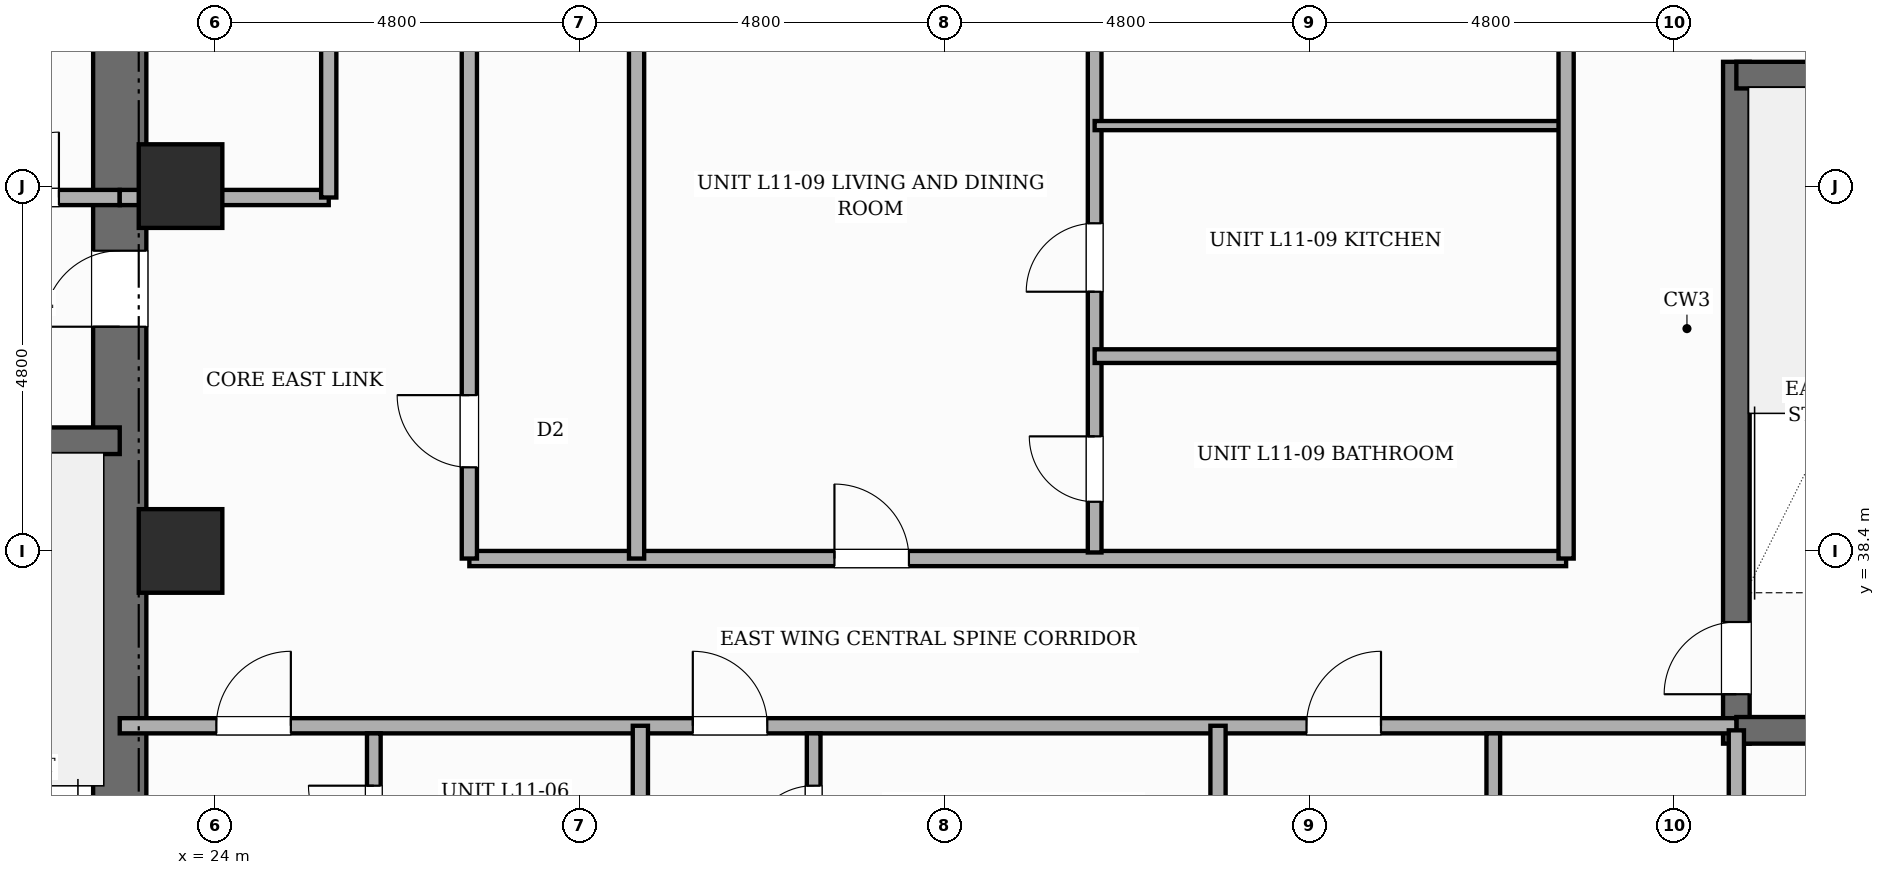
"""IFC4 building model, lengths in metres.
Left out: names, types, materials, properties, quantities, classifications, styles, units other than length and angle.
Written with IfcOpenShell. Run it as: python <this file> out.ifc"""

import sys

from ifc_helpers import new_model, si_unit, direction, frame, frame_2d, origin, origin_2d, place, context, subcontext, project, spatial, rectangle, extrude, element, fill, save


model = new_model("IFC4")
c1 = context("Model", 3, precision=1e-05, world=origin(), true_north=direction((0.0, 1.0)))
c2 = subcontext(c1, "Body", "Model", "MODEL_VIEW")
j1 = project(units=[si_unit("LENGTHUNIT", "METRE"), si_unit("PLANEANGLEUNIT", "RADIAN")], contexts=[c1])
p1 = place(None, origin())
s1 = spatial("IfcSite", under=j1, at=p1, CompositionType="ELEMENT")
p2 = place(p1, origin())
s2 = spatial("IfcBuilding", under=s1, at=p2, CompositionType="ELEMENT")
p3 = place(p2, frame((0.0, 0.0, 46.6)))
s3 = spatial("IfcBuildingStorey", under=s2, at=p3, CompositionType="ELEMENT", Elevation=46.6)
p4 = place(p3, frame((22.75, 30.55, 0.0), z_axis=(0.0, 0.0, 1.0), x_axis=(0.0, 1.0, 0.0)))
e1 = element("IfcWall", 1, at=p4, inside=s3, PredefinedType="SHEAR", context=c2, shape_type="SweptSolid", body=[
    extrude(rectangle(XDim=15.6, YDim=0.7, at=frame_2d((7.8, 0.0))), origin(), (0.0, 0.0, 1.0), 3.6),
])
p5 = place(p4, frame((10.8, 0.0, 0.0)))
e2 = element("IfcOpeningElement", 2, at=p5, cuts=e1, PredefinedType="OPENING", context=c2, shape_type="SweptSolid", body=[
    extrude(rectangle(XDim=1.0, YDim=2.15, at=frame_2d((0.5, 1.075))), frame((0.0, 0.36, 0.0), z_axis=(0.0, -1.0, 0.0), x_axis=(1.0, 0.0, 0.0)), (0.0, 0.0, 1.0), 0.72),
])
p6 = place(p3, frame((18.84, 39.85, 0.0), z_axis=(0.0, 0.0, 1.0), x_axis=(1.0, 0.0, 0.0)))
e3 = element("IfcWall", 3, at=p6, inside=s3, PredefinedType="SHEAR", context=c2, shape_type="SweptSolid", body=[
    extrude(rectangle(XDim=3.91, YDim=0.35, at=frame_2d((1.955, 0.0))), origin(), (0.0, 0.0, 1.0), 3.6),
])
p7 = place(p3, frame((44.02, 35.865, 0.0), z_axis=(0.0, 0.0, 1.0), x_axis=(0.0, 1.0, 0.0)))
e4 = element("IfcWall", 4, at=p7, inside=s3, PredefinedType="SHEAR", context=c2, shape_type="SweptSolid", body=[
    extrude(rectangle(XDim=8.97, YDim=0.35, at=frame_2d((4.485, 0.0))), origin(), (0.0, 0.0, 1.0), 3.6),
])
p8 = place(p7, frame((0.65, 0.0, 0.0)))
e5 = element("IfcOpeningElement", 5, at=p8, cuts=e4, PredefinedType="OPENING", context=c2, shape_type="SweptSolid", body=[
    extrude(rectangle(XDim=0.95, YDim=2.1, at=frame_2d((0.475, 1.05))), frame((0.0, 0.185, 0.0), z_axis=(0.0, -1.0, 0.0), x_axis=(1.0, 0.0, 0.0)), (0.0, 0.0, 1.0), 0.37),
])
for number, where, z_axis, x_axis in (
    (6, (44.02, 36.04, 0.0), (0.0, 0.0, 1.0), (1.0, 0.0, 0.0)),
    (7, (44.02, 44.66, 0.0), (0.0, 0.0, 1.0), (1.0, 0.0, 0.0)),
):
    element("IfcWall", number, at=place(p3, frame(where, z_axis=z_axis, x_axis=x_axis)), inside=s3, PredefinedType="SHEAR", context=c2, shape_type="SweptSolid", body=[
        extrude(rectangle(XDim=3.58, YDim=0.35, at=frame_2d((1.79, 0.0))), origin(), (0.0, 0.0, 1.0), 3.6),
    ])
for number, where, z_axis, x_axis in (
    (8, (23.55, 38.4, 0.0), (0.0, 0.0, 1.0), (1.0, 0.0, 0.0)),
    (9, (23.55, 43.2, 0.0), (0.0, 0.0, 1.0), (1.0, 0.0, 0.0)),
):
    element("IfcColumn", number, at=place(p3, frame(where, z_axis=z_axis, x_axis=x_axis)), inside=s3, PredefinedType="COLUMN", context=c2, shape_type="SweptSolid", body=[
        extrude(rectangle(XDim=1.1, YDim=1.1, at=origin_2d()), origin(), (0.0, 0.0, 1.0), 3.6),
    ])
p9 = place(p3, frame((18.84, 43.05, 0.0), z_axis=(0.0, 0.0, 1.0), x_axis=(1.0, 0.0, 0.0)))
e10 = element("IfcWall", 10, at=p9, inside=s3, PredefinedType="POLYGONAL", context=c2, shape_type="SweptSolid", body=[
    extrude(rectangle(XDim=3.91, YDim=0.2, at=frame_2d((1.955, 0.0))), origin(), (0.0, 0.0, 1.0), 2.53),
])
p10 = place(p9, frame((0.55, 0.0, 0.0)))
e11 = element("IfcOpeningElement", 11, at=p10, cuts=e10, PredefinedType="OPENING", context=c2, shape_type="SweptSolid", body=[
    extrude(rectangle(XDim=0.88, YDim=2.1, at=frame_2d((0.44, 1.05))), frame((0.0, 0.11, 0.0), z_axis=(0.0, -1.0, 0.0), x_axis=(1.0, 0.0, 0.0)), (0.0, 0.0, 1.0), 0.22),
])
p11 = place(p9, frame((2.25, 0.0, 0.0)))
e12 = element("IfcOpeningElement", 12, at=p11, cuts=e10, PredefinedType="OPENING", context=c2, shape_type="SweptSolid", body=[
    extrude(rectangle(XDim=0.86, YDim=2.1, at=frame_2d((0.43, 1.05))), frame((0.0, 0.11, 0.0), z_axis=(0.0, -1.0, 0.0), x_axis=(1.0, 0.0, 0.0)), (0.0, 0.0, 1.0), 0.22),
])
p12 = place(p3, frame((22.75, 36.1, 0.0), z_axis=(0.0, 0.0, 1.0), x_axis=(1.0, 0.0, 0.0)))
e13 = element("IfcWall", 13, at=p12, inside=s3, PredefinedType="PARTITIONING", context=c2, shape_type="SweptSolid", body=[
    extrude(rectangle(XDim=21.27, YDim=0.2, at=frame_2d((10.635, 0.0))), origin(), (0.0, 0.0, 1.0), 3.35),
])
p13 = place(p12, frame((1.271, 0.0, 0.0)))
e14 = element("IfcOpeningElement", 14, at=p13, cuts=e13, PredefinedType="OPENING", context=c2, shape_type="SweptSolid", body=[
    extrude(rectangle(XDim=0.98, YDim=2.18, at=frame_2d((0.49, 1.09))), frame((0.0, 0.11, 0.0), z_axis=(0.0, -1.0, 0.0), x_axis=(1.0, 0.0, 0.0)), (0.0, 0.0, 1.0), 0.22),
])
p14 = place(p12, frame((7.54, 0.0, 0.0)))
e15 = element("IfcOpeningElement", 15, at=p14, cuts=e13, PredefinedType="OPENING", context=c2, shape_type="SweptSolid", body=[
    extrude(rectangle(XDim=0.98, YDim=2.18, at=frame_2d((0.49, 1.09))), frame((0.0, 0.11, 0.0), z_axis=(0.0, -1.0, 0.0), x_axis=(1.0, 0.0, 0.0)), (0.0, 0.0, 1.0), 0.22),
])
p15 = place(p12, frame((15.615, 0.0, 0.0)))
e16 = element("IfcOpeningElement", 16, at=p15, cuts=e13, PredefinedType="OPENING", context=c2, shape_type="SweptSolid", body=[
    extrude(rectangle(XDim=0.98, YDim=2.18, at=frame_2d((0.49, 1.09))), frame((0.0, 0.11, 0.0), z_axis=(0.0, -1.0, 0.0), x_axis=(1.0, 0.0, 0.0)), (0.0, 0.0, 1.0), 0.22),
])
p16 = place(p3, frame((27.35, 38.3, 0.0), z_axis=(0.0, 0.0, 1.0), x_axis=(1.0, 0.0, 0.0)))
e17 = element("IfcWall", 17, at=p16, inside=s3, PredefinedType="PARTITIONING", context=c2, shape_type="SweptSolid", body=[
    extrude(rectangle(XDim=14.43, YDim=0.2, at=frame_2d((7.215, 0.0))), origin(), (0.0, 0.0, 1.0), 3.35),
])
p17 = place(p16, frame((4.803, 0.0, 0.0)))
e18 = element("IfcOpeningElement", 18, at=p17, cuts=e17, PredefinedType="OPENING", context=c2, shape_type="SweptSolid", body=[
    extrude(rectangle(XDim=0.98, YDim=2.18, at=frame_2d((0.49, 1.09))), frame((0.0, 0.11, 0.0), z_axis=(0.0, -1.0, 0.0), x_axis=(1.0, 0.0, 0.0)), (0.0, 0.0, 1.0), 0.22),
])
p18 = place(p3, frame((27.35, 38.3, 0.0), z_axis=(0.0, 0.0, 1.0), x_axis=(0.0, 1.0, 0.0)))
e19 = element("IfcWall", 19, at=p18, inside=s3, PredefinedType="PARTITIONING", context=c2, shape_type="SweptSolid", body=[
    extrude(rectangle(XDim=9.38, YDim=0.2, at=frame_2d((4.69, 0.0))), origin(), (0.0, 0.0, 1.0), 3.35),
])
p19 = place(p18, frame((1.2, 0.0, 0.0)))
e20 = element("IfcOpeningElement", 20, at=p19, cuts=e19, PredefinedType="OPENING", context=c2, shape_type="SweptSolid", body=[
    extrude(rectangle(XDim=0.95, YDim=2.15, at=frame_2d((0.475, 1.075))), frame((0.0, 0.11, 0.0), z_axis=(0.0, -1.0, 0.0), x_axis=(1.0, 0.0, 0.0)), (0.0, 0.0, 1.0), 0.22),
])
p20 = place(p3, frame((22.75, 43.05, 0.0), z_axis=(0.0, 0.0, 1.0), x_axis=(1.0, 0.0, 0.0)))
e21 = element("IfcWall", 21, at=p20, inside=s3, PredefinedType="PARTITIONING", context=c2, shape_type="SweptSolid", body=[
    extrude(rectangle(XDim=2.75, YDim=0.2, at=frame_2d((1.375, 0.0))), origin(), (0.0, 0.0, 1.0), 2.53),
])
p21 = place(p3, frame((25.5, 43.05, 0.0), z_axis=(0.0, 0.0, 1.0), x_axis=(0.0, 1.0, 0.0)))
e22 = element("IfcWall", 22, at=p21, inside=s3, PredefinedType="PARTITIONING", context=c2, shape_type="SweptSolid", body=[
    extrude(rectangle(XDim=2.75, YDim=0.2, at=frame_2d((1.375, 0.0))), origin(), (0.0, 0.0, 1.0), 3.35),
])
p22 = place(p3, frame((29.55, 38.3, 0.0), z_axis=(0.0, 0.0, 1.0), x_axis=(0.0, 1.0, 0.0)))
e23 = element("IfcWall", 23, at=p22, inside=s3, PredefinedType="SOLIDWALL", context=c2, shape_type="SweptSolid", body=[
    extrude(rectangle(XDim=9.38, YDim=0.2, at=frame_2d((4.69, 0.0))), origin(), (0.0, 0.0, 1.0), 3.35),
])
p23 = place(p3, frame((26.093, 29.1, 0.0), z_axis=(0.0, 0.0, 1.0), x_axis=(0.0, 1.0, 0.0)))
e24 = element("IfcWall", 24, at=p23, inside=s3, PredefinedType="PLUMBINGWALL", context=c2, shape_type="SweptSolid", body=[
    extrude(rectangle(XDim=6.9, YDim=0.18, at=frame_2d((3.45, 0.0))), origin(), (0.0, 0.0, 1.0), 3.35),
])
p24 = place(p23, frame((0.637, 0.0, 0.0)))
e25 = element("IfcOpeningElement", 25, at=p24, cuts=e24, PredefinedType="OPENING", context=c2, shape_type="SweptSolid", body=[
    extrude(rectangle(XDim=0.9, YDim=2.15, at=frame_2d((0.45, 1.075))), frame((0.0, 0.1, 0.0), z_axis=(0.0, -1.0, 0.0), x_axis=(1.0, 0.0, 0.0)), (0.0, 0.0, 1.0), 0.2),
])
p25 = place(p23, frame((3.23, 0.0, 0.0)))
e26 = element("IfcOpeningElement", 26, at=p25, cuts=e24, PredefinedType="OPENING", context=c2, shape_type="SweptSolid", body=[
    extrude(rectangle(XDim=0.9, YDim=2.15, at=frame_2d((0.45, 1.075))), frame((0.0, 0.1, 0.0), z_axis=(0.0, -1.0, 0.0), x_axis=(1.0, 0.0, 0.0)), (0.0, 0.0, 1.0), 0.2),
])
p26 = place(p23, frame((5.352, 0.0, 0.0)))
e27 = element("IfcOpeningElement", 27, at=p26, cuts=e24, PredefinedType="OPENING", context=c2, shape_type="SweptSolid", body=[
    extrude(rectangle(XDim=0.86, YDim=2.1, at=frame_2d((0.43, 1.05))), frame((0.0, 0.1, 0.0), z_axis=(0.0, -1.0, 0.0), x_axis=(1.0, 0.0, 0.0)), (0.0, 0.0, 1.0), 0.2),
])
p27 = place(p3, frame((29.6, 29.12, 0.0), z_axis=(0.0, 0.0, 1.0), x_axis=(0.0, 1.0, 0.0)))
e28 = element("IfcWall", 28, at=p27, inside=s3, PredefinedType="SOLIDWALL", context=c2, shape_type="SweptSolid", body=[
    extrude(rectangle(XDim=6.98, YDim=0.2, at=frame_2d((3.49, 0.0))), origin(), (0.0, 0.0, 1.0), 3.35),
])
p28 = place(p3, frame((31.88, 29.12, 0.0), z_axis=(0.0, 0.0, 1.0), x_axis=(0.0, 1.0, 0.0)))
e29 = element("IfcWall", 29, at=p28, inside=s3, PredefinedType="PLUMBINGWALL", context=c2, shape_type="SweptSolid", body=[
    extrude(rectangle(XDim=6.88, YDim=0.18, at=frame_2d((3.44, 0.0))), origin(), (0.0, 0.0, 1.0), 3.35),
])
p29 = place(p28, frame((0.917, 0.0, 0.0)))
e30 = element("IfcOpeningElement", 30, at=p29, cuts=e29, PredefinedType="OPENING", context=c2, shape_type="SweptSolid", body=[
    extrude(rectangle(XDim=0.9, YDim=2.15, at=frame_2d((0.45, 1.075))), frame((0.0, 0.1, 0.0), z_axis=(0.0, -1.0, 0.0), x_axis=(1.0, 0.0, 0.0)), (0.0, 0.0, 1.0), 0.2),
])
p30 = place(p28, frame((3.21, 0.0, 0.0)))
e31 = element("IfcOpeningElement", 31, at=p30, cuts=e29, PredefinedType="OPENING", context=c2, shape_type="SweptSolid", body=[
    extrude(rectangle(XDim=0.9, YDim=2.15, at=frame_2d((0.45, 1.075))), frame((0.0, 0.1, 0.0), z_axis=(0.0, -1.0, 0.0), x_axis=(1.0, 0.0, 0.0)), (0.0, 0.0, 1.0), 0.2),
])
p31 = place(p28, frame((5.332, 0.0, 0.0)))
e32 = element("IfcOpeningElement", 32, at=p31, cuts=e29, PredefinedType="OPENING", context=c2, shape_type="SweptSolid", body=[
    extrude(rectangle(XDim=0.86, YDim=2.1, at=frame_2d((0.43, 1.05))), frame((0.0, 0.1, 0.0), z_axis=(0.0, -1.0, 0.0), x_axis=(1.0, 0.0, 0.0)), (0.0, 0.0, 1.0), 0.2),
])
p32 = place(p3, frame((37.2, 29.12, 0.0), z_axis=(0.0, 0.0, 1.0), x_axis=(0.0, 1.0, 0.0)))
e33 = element("IfcWall", 33, at=p32, inside=s3, PredefinedType="SOLIDWALL", context=c2, shape_type="SweptSolid", body=[
    extrude(rectangle(XDim=6.98, YDim=0.2, at=frame_2d((3.49, 0.0))), origin(), (0.0, 0.0, 1.0), 3.35),
])
p33 = place(p3, frame((40.822, 29.12, 0.0), z_axis=(0.0, 0.0, 1.0), x_axis=(0.0, 1.0, 0.0)))
e34 = element("IfcWall", 34, at=p33, inside=s3, PredefinedType="PLUMBINGWALL", context=c2, shape_type="SweptSolid", body=[
    extrude(rectangle(XDim=6.88, YDim=0.18, at=frame_2d((3.44, 0.0))), origin(), (0.0, 0.0, 1.0), 3.35),
])
p34 = place(p33, frame((1.116, 0.0, 0.0)))
e35 = element("IfcOpeningElement", 35, at=p34, cuts=e34, PredefinedType="OPENING", context=c2, shape_type="SweptSolid", body=[
    extrude(rectangle(XDim=0.9, YDim=2.15, at=frame_2d((0.45, 1.075))), frame((0.0, 0.1, 0.0), z_axis=(0.0, -1.0, 0.0), x_axis=(1.0, 0.0, 0.0)), (0.0, 0.0, 1.0), 0.2),
])
p35 = place(p33, frame((4.705, 0.0, 0.0)))
e36 = element("IfcOpeningElement", 36, at=p35, cuts=e34, PredefinedType="OPENING", context=c2, shape_type="SweptSolid", body=[
    extrude(rectangle(XDim=0.86, YDim=2.1, at=frame_2d((0.43, 1.05))), frame((0.0, 0.1, 0.0), z_axis=(0.0, -1.0, 0.0), x_axis=(1.0, 0.0, 0.0)), (0.0, 0.0, 1.0), 0.2),
])
p36 = place(p3, frame((35.577, 38.38, 0.0), z_axis=(0.0, 0.0, 1.0), x_axis=(0.0, 1.0, 0.0)))
e37 = element("IfcWall", 37, at=p36, inside=s3, PredefinedType="PLUMBINGWALL", context=c2, shape_type="SweptSolid", body=[
    extrude(rectangle(XDim=9.3, YDim=0.18, at=frame_2d((4.65, 0.0))), origin(), (0.0, 0.0, 1.0), 3.35),
])
p37 = place(p36, frame((0.667, 0.0, 0.0)))
e38 = element("IfcOpeningElement", 38, at=p37, cuts=e37, PredefinedType="OPENING", context=c2, shape_type="SweptSolid", body=[
    extrude(rectangle(XDim=0.86, YDim=2.1, at=frame_2d((0.43, 1.05))), frame((0.0, 0.1, 0.0), z_axis=(0.0, -1.0, 0.0), x_axis=(1.0, 0.0, 0.0)), (0.0, 0.0, 1.0), 0.2),
])
p38 = place(p36, frame((3.43, 0.0, 0.0)))
e39 = element("IfcOpeningElement", 39, at=p38, cuts=e37, PredefinedType="OPENING", context=c2, shape_type="SweptSolid", body=[
    extrude(rectangle(XDim=0.9, YDim=2.15, at=frame_2d((0.45, 1.075))), frame((0.0, 0.1, 0.0), z_axis=(0.0, -1.0, 0.0), x_axis=(1.0, 0.0, 0.0)), (0.0, 0.0, 1.0), 0.2),
])
p39 = place(p36, frame((6.828, 0.0, 0.0)))
e40 = element("IfcOpeningElement", 40, at=p39, cuts=e37, PredefinedType="OPENING", context=c2, shape_type="SweptSolid", body=[
    extrude(rectangle(XDim=0.9, YDim=2.15, at=frame_2d((0.45, 1.075))), frame((0.0, 0.1, 0.0), z_axis=(0.0, -1.0, 0.0), x_axis=(1.0, 0.0, 0.0)), (0.0, 0.0, 1.0), 0.2),
])
p40 = place(p3, frame((35.577, 40.963, 0.0), z_axis=(0.0, 0.0, 1.0), x_axis=(1.0, 0.0, 0.0)))
e41 = element("IfcWall", 41, at=p40, inside=s3, PredefinedType="PLUMBINGWALL", context=c2, shape_type="SweptSolid", body=[
    extrude(rectangle(XDim=6.123, YDim=0.18, at=frame_2d((3.062, 0.0))), origin(), (0.0, 0.0, 1.0), 3.35),
])
p41 = place(p3, frame((35.577, 43.996, 0.0), z_axis=(0.0, 0.0, 1.0), x_axis=(1.0, 0.0, 0.0)))
e42 = element("IfcWall", 42, at=p41, inside=s3, PredefinedType="PARTITIONING", context=c2, shape_type="SweptSolid", body=[
    extrude(rectangle(XDim=6.123, YDim=0.12, at=frame_2d((3.062, 0.0))), origin(), (0.0, 0.0, 1.0), 3.35),
])
p42 = place(p3, frame((41.78, 38.3, 0.0), z_axis=(0.0, 0.0, 1.0), x_axis=(0.0, 1.0, 0.0)))
e43 = element("IfcWall", 43, at=p42, inside=s3, PredefinedType="PARTITIONING", context=c2, shape_type="SweptSolid", body=[
    extrude(rectangle(XDim=9.38, YDim=0.2, at=frame_2d((4.69, 0.0))), origin(), (0.0, 0.0, 1.0), 3.35),
])
p43 = place(p3, frame((44.02, 29.12, 0.0), z_axis=(0.0, 0.0, 1.0), x_axis=(0.0, 1.0, 0.0)))
e44 = element("IfcWall", 44, at=p43, inside=s3, PredefinedType="SOLIDWALL", context=c2, shape_type="SweptSolid", body=[
    extrude(rectangle(XDim=6.92, YDim=0.2, at=frame_2d((3.46, 0.0))), origin(), (0.0, 0.0, 1.0), 3.35),
])
p44 = place(p8, origin())
e45 = element("IfcDoor", 45, at=p44, inside=s3, OperationType="SINGLE_SWING_LEFT", PredefinedType="DOOR", context=c2, shape_type="SweptSolid", body=[
    extrude(rectangle(XDim=0.95, YDim=2.1, at=frame_2d((0.475, 1.05))), frame((0.0, 0.025, 0.0), z_axis=(0.0, -1.0, 0.0), x_axis=(1.0, 0.0, 0.0)), (0.0, 0.0, 1.0), 0.05),
])
fill(e5, e45)
p45 = place(p5, origin())
e46 = element("IfcDoor", 46, at=p45, inside=s3, OperationType="SINGLE_SWING_LEFT", PredefinedType="DOOR", context=c2, shape_type="SweptSolid", body=[
    extrude(rectangle(XDim=1.0, YDim=2.15, at=frame_2d((0.5, 1.075))), frame((0.0, 0.025, 0.0), z_axis=(0.0, -1.0, 0.0), x_axis=(1.0, 0.0, 0.0)), (0.0, 0.0, 1.0), 0.05),
])
fill(e2, e46)
p46 = place(p11, origin())
e47 = element("IfcDoor", 47, at=p46, inside=s3, OperationType="SINGLE_SWING_RIGHT", PredefinedType="DOOR", context=c2, shape_type="SweptSolid", body=[
    extrude(rectangle(XDim=0.86, YDim=2.1, at=frame_2d((0.43, 1.05))), frame((0.0, 0.025, 0.0), z_axis=(0.0, -1.0, 0.0), x_axis=(1.0, 0.0, 0.0)), (0.0, 0.0, 1.0), 0.05),
])
fill(e12, e47)
p47 = place(p19, origin())
e48 = element("IfcDoor", 48, at=p47, inside=s3, OperationType="SINGLE_SWING_RIGHT", PredefinedType="DOOR", context=c2, shape_type="SweptSolid", body=[
    extrude(rectangle(XDim=0.95, YDim=2.15, at=frame_2d((0.475, 1.075))), frame((0.0, 0.025, 0.0), z_axis=(0.0, -1.0, 0.0), x_axis=(1.0, 0.0, 0.0)), (0.0, 0.0, 1.0), 0.05),
])
fill(e20, e48)
p48 = place(p13, origin())
e49 = element("IfcDoor", 49, at=p48, inside=s3, OperationType="SINGLE_SWING_RIGHT", PredefinedType="DOOR", context=c2, shape_type="SweptSolid", body=[
    extrude(rectangle(XDim=0.98, YDim=2.18, at=frame_2d((0.49, 1.09))), frame((0.0, 0.025, 0.0), z_axis=(0.0, -1.0, 0.0), x_axis=(1.0, 0.0, 0.0)), (0.0, 0.0, 1.0), 0.05),
])
fill(e14, e49)
p49 = place(p26, origin())
e50 = element("IfcDoor", 50, at=p49, inside=s3, OperationType="SINGLE_SWING_RIGHT", PredefinedType="DOOR", context=c2, shape_type="SweptSolid", body=[
    extrude(rectangle(XDim=0.86, YDim=2.1, at=frame_2d((0.43, 1.05))), frame((0.0, 0.025, 0.0), z_axis=(0.0, -1.0, 0.0), x_axis=(1.0, 0.0, 0.0)), (0.0, 0.0, 1.0), 0.05),
])
fill(e27, e50)
p50 = place(p14, origin())
e51 = element("IfcDoor", 51, at=p50, inside=s3, OperationType="SINGLE_SWING_LEFT", PredefinedType="DOOR", context=c2, shape_type="SweptSolid", body=[
    extrude(rectangle(XDim=0.98, YDim=2.18, at=frame_2d((0.49, 1.09))), frame((0.0, 0.025, 0.0), z_axis=(0.0, -1.0, 0.0), x_axis=(1.0, 0.0, 0.0)), (0.0, 0.0, 1.0), 0.05),
])
fill(e15, e51)
p51 = place(p31, origin())
e52 = element("IfcDoor", 52, at=p51, inside=s3, OperationType="SINGLE_SWING_LEFT", PredefinedType="DOOR", context=c2, shape_type="SweptSolid", body=[
    extrude(rectangle(XDim=0.86, YDim=2.1, at=frame_2d((0.43, 1.05))), frame((0.0, 0.025, 0.0), z_axis=(0.0, -1.0, 0.0), x_axis=(1.0, 0.0, 0.0)), (0.0, 0.0, 1.0), 0.05),
])
fill(e32, e52)
p52 = place(p15, origin())
e53 = element("IfcDoor", 53, at=p52, inside=s3, OperationType="SINGLE_SWING_RIGHT", PredefinedType="DOOR", context=c2, shape_type="SweptSolid", body=[
    extrude(rectangle(XDim=0.98, YDim=2.18, at=frame_2d((0.49, 1.09))), frame((0.0, 0.025, 0.0), z_axis=(0.0, -1.0, 0.0), x_axis=(1.0, 0.0, 0.0)), (0.0, 0.0, 1.0), 0.05),
])
fill(e16, e53)
p53 = place(p17, origin())
e54 = element("IfcDoor", 54, at=p53, inside=s3, OperationType="SINGLE_SWING_LEFT", PredefinedType="DOOR", context=c2, shape_type="SweptSolid", body=[
    extrude(rectangle(XDim=0.98, YDim=2.18, at=frame_2d((0.49, 1.09))), frame((0.0, 0.025, 0.0), z_axis=(0.0, -1.0, 0.0), x_axis=(1.0, 0.0, 0.0)), (0.0, 0.0, 1.0), 0.05),
])
fill(e18, e54)
p54 = place(p37, origin())
e55 = element("IfcDoor", 55, at=p54, inside=s3, OperationType="SINGLE_SWING_RIGHT", PredefinedType="DOOR", context=c2, shape_type="SweptSolid", body=[
    extrude(rectangle(XDim=0.86, YDim=2.1, at=frame_2d((0.43, 1.05))), frame((0.0, 0.025, 0.0), z_axis=(0.0, -1.0, 0.0), x_axis=(1.0, 0.0, 0.0)), (0.0, 0.0, 1.0), 0.05),
])
fill(e38, e55)
p55 = place(p38, origin())
e56 = element("IfcDoor", 56, at=p55, inside=s3, OperationType="SINGLE_SWING_LEFT", PredefinedType="DOOR", context=c2, shape_type="SweptSolid", body=[
    extrude(rectangle(XDim=0.9, YDim=2.15, at=frame_2d((0.45, 1.075))), frame((0.0, 0.025, 0.0), z_axis=(0.0, -1.0, 0.0), x_axis=(1.0, 0.0, 0.0)), (0.0, 0.0, 1.0), 0.05),
])
fill(e39, e56)
save(model, sys.argv[1])
